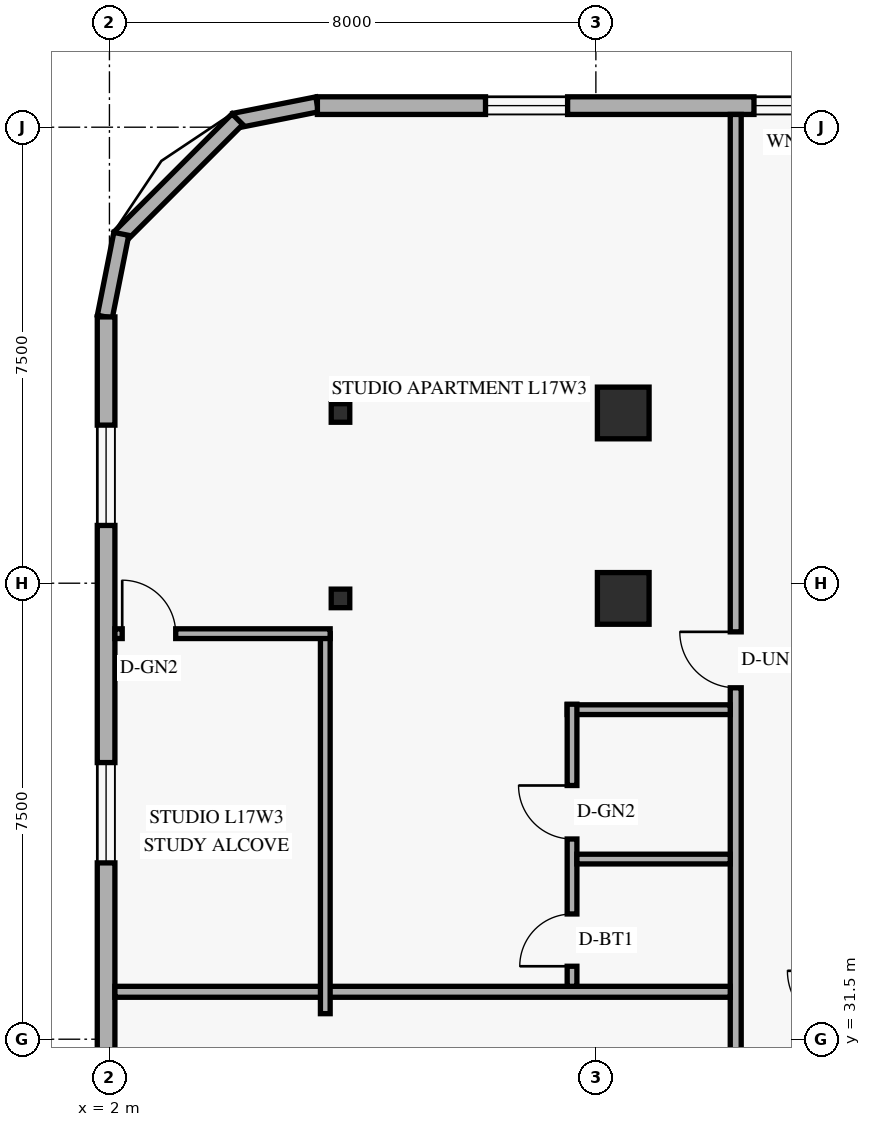
"""IFC4 building model, lengths in metres.
Left out: names, types, materials, properties, quantities, classifications, styles, units other than length and angle.
Written with IfcOpenShell. Run it as: python <this file> out.ifc"""

import sys

from ifc_helpers import new_model, si_unit, direction, frame, frame_2d, origin, origin_2d, place, context, subcontext, project, spatial, rectangle, hollow_rectangle, extrude, element, fill, save


model = new_model("IFC4")
c1 = context("Model", 3, precision=1e-05, world=origin(), true_north=direction((0.0, 1.0)))
c2 = subcontext(c1, "Body", "Model", "MODEL_VIEW")
j1 = project(units=[si_unit("LENGTHUNIT", "METRE"), si_unit("PLANEANGLEUNIT", "RADIAN")], contexts=[c1])
p1 = place(None, origin())
s1 = spatial("IfcSite", under=j1, at=p1, CompositionType="ELEMENT")
p2 = place(p1, origin())
s2 = spatial("IfcBuilding", under=s1, at=p2, CompositionType="ELEMENT")
p3 = place(p2, frame((0.0, 0.0, 67.8)))
s3 = spatial("IfcBuildingStorey", under=s2, at=p3, CompositionType="ELEMENT", Elevation=67.8)
for number, where, z_axis, x_axis in (
    (1, (5.8, 38.75, 0.0), (0.0, 0.0, 1.0), (1.0, 0.0, 0.0)),
    (2, (5.8, 41.8, 0.0), (0.0, 0.0, 1.0), (1.0, 0.0, 0.0)),
):
    element("IfcColumn", number, at=place(p3, frame(where, z_axis=z_axis, x_axis=x_axis)), inside=s3, PredefinedType="COLUMN", context=c2, shape_type="SweptSolid", body=[
        extrude(hollow_rectangle(XDim=0.305, YDim=0.305, WallThickness=0.013, at=origin_2d()), origin(), (0.0, 0.0, 1.0), 3.6),
    ])
for number, where, z_axis, x_axis in (
    (3, (10.45, 38.75, 0.0), (0.0, 0.0, 1.0), (1.0, 0.0, 0.0)),
    (4, (10.45, 41.8, 0.0), (0.0, 0.0, 1.0), (1.0, 0.0, 0.0)),
):
    element("IfcColumn", number, at=place(p3, frame(where, z_axis=z_axis, x_axis=x_axis)), inside=s3, PredefinedType="COLUMN", context=c2, shape_type="SweptSolid", body=[
        extrude(rectangle(XDim=0.85, YDim=0.85, at=origin_2d()), origin(), (0.0, 0.0, 1.0), 3.6),
    ])
p4 = place(p3, frame((5.417, 46.876, 0.0), z_axis=(0.0, 0.0, 1.0), x_axis=(-0.980809899341, -0.19496651342, 0.0)))
e5 = element("IfcWall", 5, at=p4, inside=s3, PredefinedType="SOLIDWALL", context=c2, shape_type="SweptSolid", body=[
    extrude(rectangle(XDim=1.389, YDim=0.25, at=frame_2d((0.694, 0.0))), origin(), (0.0, 0.0, 1.0), 3.3),
])
p5 = place(p3, frame((4.105, 46.632, 0.0), z_axis=(0.0, 0.0, 1.0), x_axis=(-0.707106781187, -0.707106781187, 0.0)))
e6 = element("IfcWall", 6, at=p5, inside=s3, PredefinedType="SOLIDWALL", context=c2, shape_type="SweptSolid", body=[
    extrude(rectangle(XDim=2.739, YDim=0.25, at=frame_2d((1.37, 0.0))), origin(), (0.0, 0.0, 1.0), 3.3),
])
p6 = place(p3, frame((2.195, 44.746, 0.0), z_axis=(0.0, 0.0, 1.0), x_axis=(-0.19496651342, -0.980809899341, 0.0)))
e7 = element("IfcWall", 7, at=p6, inside=s3, PredefinedType="SOLIDWALL", context=c2, shape_type="SweptSolid", body=[
    extrude(rectangle(XDim=1.389, YDim=0.25, at=frame_2d((0.694, 0.0))), origin(), (0.0, 0.0, 1.0), 3.3),
])
p7 = place(p3, frame((44.98, 46.855, 0.0), z_axis=(0.0, 0.0, 1.0), x_axis=(-1.0, 0.0, 0.0)))
e8 = element("IfcWall", 8, at=p7, inside=s3, PredefinedType="SOLIDWALL", context=c2, shape_type="SweptSolid", body=[
    extrude(rectangle(XDim=39.56, YDim=0.29, at=frame_2d((19.78, 0.0))), origin(), (0.0, 0.0, 1.0), 3.3),
])
p8 = place(p7, frame((35.445, 0.0, 0.85)))
e9 = element("IfcOpeningElement", 9, at=p8, cuts=e8, PredefinedType="OPENING", context=c2, shape_type="SweptSolid", body=[
    extrude(rectangle(XDim=1.35, YDim=1.55, at=frame_2d((0.675, 0.775))), frame((0.0, 0.155, 0.0), z_axis=(0.0, -1.0, 0.0), x_axis=(1.0, 0.0, 0.0)), (0.0, 0.0, 1.0), 0.31),
])
p9 = place(p7, frame((31.18, 0.0, 0.85)))
e10 = element("IfcOpeningElement", 10, at=p9, cuts=e8, PredefinedType="OPENING", context=c2, shape_type="SweptSolid", body=[
    extrude(rectangle(XDim=1.2, YDim=1.5, at=frame_2d((0.6, 0.75))), frame((0.0, 0.155, 0.0), z_axis=(0.0, -1.0, 0.0), x_axis=(1.0, 0.0, 0.0)), (0.0, 0.0, 1.0), 0.31),
])
p10 = place(p7, frame((25.834, 0.0, 0.85)))
e11 = element("IfcOpeningElement", 11, at=p10, cuts=e8, PredefinedType="OPENING", context=c2, shape_type="SweptSolid", body=[
    extrude(rectangle(XDim=1.35, YDim=1.55, at=frame_2d((0.675, 0.775))), frame((0.0, 0.155, 0.0), z_axis=(0.0, -1.0, 0.0), x_axis=(1.0, 0.0, 0.0)), (0.0, 0.0, 1.0), 0.31),
])
p11 = place(p7, frame((18.799, 0.0, 0.85)))
e12 = element("IfcOpeningElement", 12, at=p11, cuts=e8, PredefinedType="OPENING", context=c2, shape_type="SweptSolid", body=[
    extrude(rectangle(XDim=1.35, YDim=1.55, at=frame_2d((0.675, 0.775))), frame((0.0, 0.155, 0.0), z_axis=(0.0, -1.0, 0.0), x_axis=(1.0, 0.0, 0.0)), (0.0, 0.0, 1.0), 0.31),
])
p12 = place(p7, frame((12.51, 0.0, 0.85)))
e13 = element("IfcOpeningElement", 13, at=p12, cuts=e8, PredefinedType="OPENING", context=c2, shape_type="SweptSolid", body=[
    extrude(rectangle(XDim=1.35, YDim=1.55, at=frame_2d((0.675, 0.775))), frame((0.0, 0.155, 0.0), z_axis=(0.0, -1.0, 0.0), x_axis=(1.0, 0.0, 0.0)), (0.0, 0.0, 1.0), 0.31),
])
p13 = place(p7, frame((7.82, 0.0, 0.85)))
e14 = element("IfcOpeningElement", 14, at=p13, cuts=e8, PredefinedType="OPENING", context=c2, shape_type="SweptSolid", body=[
    extrude(rectangle(XDim=1.35, YDim=1.55, at=frame_2d((0.675, 0.775))), frame((0.0, 0.155, 0.0), z_axis=(0.0, -1.0, 0.0), x_axis=(1.0, 0.0, 0.0)), (0.0, 0.0, 1.0), 0.31),
])
p14 = place(p7, frame((3.04, 0.0, 0.85)))
e15 = element("IfcOpeningElement", 15, at=p14, cuts=e8, PredefinedType="OPENING", context=c2, shape_type="SweptSolid", body=[
    extrude(rectangle(XDim=1.35, YDim=1.55, at=frame_2d((0.675, 0.775))), frame((0.0, 0.155, 0.0), z_axis=(0.0, -1.0, 0.0), x_axis=(1.0, 0.0, 0.0)), (0.0, 0.0, 1.0), 0.31),
])
p15 = place(p3, frame((1.945, 43.38, 0.0), z_axis=(0.0, 0.0, 1.0), x_axis=(0.0, -1.0, 0.0)))
e16 = element("IfcWall", 16, at=p15, inside=s3, PredefinedType="SOLIDWALL", context=c2, shape_type="SweptSolid", body=[
    extrude(rectangle(XDim=38.76, YDim=0.29, at=frame_2d((19.38, 0.0))), origin(), (0.0, 0.0, 1.0), 3.3),
])
p16 = place(p15, frame((31.925, 0.0, 0.85)))
e17 = element("IfcOpeningElement", 17, at=p16, cuts=e16, PredefinedType="OPENING", context=c2, shape_type="SweptSolid", body=[
    extrude(rectangle(XDim=1.65, YDim=1.6, at=frame_2d((0.825, 0.8))), frame((0.0, 0.155, 0.0), z_axis=(0.0, -1.0, 0.0), x_axis=(1.0, 0.0, 0.0)), (0.0, 0.0, 1.0), 0.31),
])
p17 = place(p15, frame((22.97, 0.0, 0.85)))
e18 = element("IfcOpeningElement", 18, at=p17, cuts=e16, PredefinedType="OPENING", context=c2, shape_type="SweptSolid", body=[
    extrude(rectangle(XDim=1.65, YDim=1.6, at=frame_2d((0.825, 0.8))), frame((0.0, 0.155, 0.0), z_axis=(0.0, -1.0, 0.0), x_axis=(1.0, 0.0, 0.0)), (0.0, 0.0, 1.0), 0.31),
])
p18 = place(p15, frame((15.15, 0.0, 0.85)))
e19 = element("IfcOpeningElement", 19, at=p18, cuts=e16, PredefinedType="OPENING", context=c2, shape_type="SweptSolid", body=[
    extrude(rectangle(XDim=1.65, YDim=1.6, at=frame_2d((0.825, 0.8))), frame((0.0, 0.155, 0.0), z_axis=(0.0, -1.0, 0.0), x_axis=(1.0, 0.0, 0.0)), (0.0, 0.0, 1.0), 0.31),
])
p19 = place(p15, frame((7.33, 0.0, 0.85)))
e20 = element("IfcOpeningElement", 20, at=p19, cuts=e16, PredefinedType="OPENING", context=c2, shape_type="SweptSolid", body=[
    extrude(rectangle(XDim=1.65, YDim=1.6, at=frame_2d((0.825, 0.8))), frame((0.0, 0.155, 0.0), z_axis=(0.0, -1.0, 0.0), x_axis=(1.0, 0.0, 0.0)), (0.0, 0.0, 1.0), 0.31),
])
p20 = place(p15, frame((1.78, 0.0, 0.85)))
e21 = element("IfcOpeningElement", 21, at=p20, cuts=e16, PredefinedType="OPENING", context=c2, shape_type="SweptSolid", body=[
    extrude(rectangle(XDim=1.65, YDim=1.6, at=frame_2d((0.825, 0.8))), frame((0.0, 0.155, 0.0), z_axis=(0.0, -1.0, 0.0), x_axis=(1.0, 0.0, 0.0)), (0.0, 0.0, 1.0), 0.31),
])
p21 = place(p3, frame((12.3, 1.29, 0.0), z_axis=(0.0, 0.0, 1.0), x_axis=(0.0, 1.0, 0.0)))
e22 = element("IfcWall", 22, at=p21, inside=s3, PredefinedType="STANDARD", context=c2, shape_type="SweptSolid", body=[
    extrude(rectangle(XDim=45.42, YDim=0.18, at=frame_2d((22.71, 0.0))), origin(), (0.0, 0.0, 1.0), 2.589),
])
p22 = place(p21, frame((9.41, 0.0, 0.0)))
e23 = element("IfcOpeningElement", 23, at=p22, cuts=e22, PredefinedType="OPENING", context=c2, shape_type="SweptSolid", body=[
    extrude(rectangle(XDim=0.92, YDim=2.15, at=frame_2d((0.46, 1.075))), frame((0.0, 0.1, 0.0), z_axis=(0.0, -1.0, 0.0), x_axis=(1.0, 0.0, 0.0)), (0.0, 0.0, 1.0), 0.2),
])
p23 = place(p21, frame((20.35, 0.0, 0.0)))
e24 = element("IfcOpeningElement", 24, at=p23, cuts=e22, PredefinedType="OPENING", context=c2, shape_type="SweptSolid", body=[
    extrude(rectangle(XDim=0.92, YDim=2.15, at=frame_2d((0.46, 1.075))), frame((0.0, 0.1, 0.0), z_axis=(0.0, -1.0, 0.0), x_axis=(1.0, 0.0, 0.0)), (0.0, 0.0, 1.0), 0.2),
])
p24 = place(p21, frame((35.99, 0.0, 0.0)))
e25 = element("IfcOpeningElement", 25, at=p24, cuts=e22, PredefinedType="OPENING", context=c2, shape_type="SweptSolid", body=[
    extrude(rectangle(XDim=0.92, YDim=2.15, at=frame_2d((0.46, 1.075))), frame((0.0, 0.1, 0.0), z_axis=(0.0, -1.0, 0.0), x_axis=(1.0, 0.0, 0.0)), (0.0, 0.0, 1.0), 0.2),
])
p25 = place(p3, frame((2.09, 32.28, 0.0), z_axis=(0.0, 0.0, 1.0), x_axis=(1.0, 0.0, 0.0)))
e26 = element("IfcWall", 26, at=p25, inside=s3, PredefinedType="PARTITIONING", context=c2, shape_type="SweptSolid", body=[
    extrude(rectangle(XDim=10.12, YDim=0.18, at=frame_2d((5.06, 0.0))), origin(), (0.0, 0.0, 1.0), 2.589),
])
p26 = place(p3, frame((9.528, 36.92, 0.0), z_axis=(0.0, 0.0, 1.0), x_axis=(1.0, 0.0, 0.0)))
e27 = element("IfcWall", 27, at=p26, inside=s3, PredefinedType="PLUMBINGWALL", context=c2, shape_type="SweptSolid", body=[
    extrude(rectangle(XDim=2.682, YDim=0.16, at=frame_2d((1.341, 0.0))), origin(), (0.0, 0.0, 1.0), 2.589),
])
p27 = place(p3, frame((9.608, 32.37, 0.0), z_axis=(0.0, 0.0, 1.0), x_axis=(0.0, 1.0, 0.0)))
e28 = element("IfcWall", 28, at=p27, inside=s3, PredefinedType="PLUMBINGWALL", context=c2, shape_type="SweptSolid", body=[
    extrude(rectangle(XDim=4.64, YDim=0.16, at=frame_2d((2.32, 0.0))), origin(), (0.0, 0.0, 1.0), 2.872),
])
p28 = place(p27, frame((0.33, 0.0, 0.0)))
e29 = element("IfcOpeningElement", 29, at=p28, cuts=e28, PredefinedType="OPENING", context=c2, shape_type="SweptSolid", body=[
    extrude(rectangle(XDim=0.86, YDim=2.12, at=frame_2d((0.43, 1.06))), frame((0.0, 0.09, 0.0), z_axis=(0.0, -1.0, 0.0), x_axis=(1.0, 0.0, 0.0)), (0.0, 0.0, 1.0), 0.18),
])
p29 = place(p27, frame((2.423, 0.0, 0.0)))
e30 = element("IfcOpeningElement", 30, at=p29, cuts=e28, PredefinedType="OPENING", context=c2, shape_type="SweptSolid", body=[
    extrude(rectangle(XDim=0.88, YDim=2.12, at=frame_2d((0.44, 1.06))), frame((0.0, 0.09, 0.0), z_axis=(0.0, -1.0, 0.0), x_axis=(1.0, 0.0, 0.0)), (0.0, 0.0, 1.0), 0.18),
])
p30 = place(p3, frame((9.688, 34.463, 0.0), z_axis=(0.0, 0.0, 1.0), x_axis=(1.0, 0.0, 0.0)))
e31 = element("IfcWall", 31, at=p30, inside=s3, PredefinedType="PLUMBINGWALL", context=c2, shape_type="SweptSolid", body=[
    extrude(rectangle(XDim=2.522, YDim=0.16, at=frame_2d((1.261, 0.0))), origin(), (0.0, 0.0, 1.0), 2.589),
])
p31 = place(p3, frame((5.55, 31.92, 0.0), z_axis=(0.0, 0.0, 1.0), x_axis=(0.0, 1.0, 0.0)))
e32 = element("IfcWall", 32, at=p31, inside=s3, PredefinedType="PARTITIONING", context=c2, shape_type="SweptSolid", body=[
    extrude(rectangle(XDim=6.25, YDim=0.16, at=frame_2d((3.125, 0.0))), origin(), (0.0, 0.0, 1.0), 3.3),
])
p32 = place(p3, frame((2.09, 38.17, 0.0), z_axis=(0.0, 0.0, 1.0), x_axis=(1.0, 0.0, 0.0)))
e33 = element("IfcWall", 33, at=p32, inside=s3, PredefinedType="PARTITIONING", context=c2, shape_type="SweptSolid", body=[
    extrude(rectangle(XDim=3.54, YDim=0.16, at=frame_2d((1.77, 0.0))), origin(), (0.0, 0.0, 1.0), 3.3),
])
p33 = place(p32, frame((0.12, 0.0, 0.0)))
e34 = element("IfcOpeningElement", 34, at=p33, cuts=e33, PredefinedType="OPENING", context=c2, shape_type="SweptSolid", body=[
    extrude(rectangle(XDim=0.88, YDim=2.12, at=frame_2d((0.44, 1.06))), frame((0.0, 0.09, 0.0), z_axis=(0.0, -1.0, 0.0), x_axis=(1.0, 0.0, 0.0)), (0.0, 0.0, 1.0), 0.18),
])
p34 = place(p8, origin())
e35 = element("IfcWindow", 35, at=p34, inside=s3, PartitioningType="SINGLE_PANEL", PredefinedType="WINDOW", context=c2, shape_type="SweptSolid", body=[
    extrude(rectangle(XDim=1.35, YDim=1.55, at=frame_2d((0.675, 0.775))), frame((0.0, 0.03, 0.0), z_axis=(0.0, -1.0, 0.0), x_axis=(1.0, 0.0, 0.0)), (0.0, 0.0, 1.0), 0.06),
])
fill(e9, e35)
p35 = place(p9, origin())
e36 = element("IfcWindow", 36, at=p35, inside=s3, PartitioningType="SINGLE_PANEL", PredefinedType="WINDOW", context=c2, shape_type="SweptSolid", body=[
    extrude(rectangle(XDim=1.2, YDim=1.5, at=frame_2d((0.6, 0.75))), frame((0.0, 0.03, 0.0), z_axis=(0.0, -1.0, 0.0), x_axis=(1.0, 0.0, 0.0)), (0.0, 0.0, 1.0), 0.06),
])
fill(e10, e36)
p36 = place(p19, origin())
e37 = element("IfcWindow", 37, at=p36, inside=s3, PartitioningType="SINGLE_PANEL", PredefinedType="WINDOW", context=c2, shape_type="SweptSolid", body=[
    extrude(rectangle(XDim=1.65, YDim=1.6, at=frame_2d((0.825, 0.8))), frame((0.0, 0.03, 0.0), z_axis=(0.0, -1.0, 0.0), x_axis=(1.0, 0.0, 0.0)), (0.0, 0.0, 1.0), 0.06),
])
fill(e20, e37)
p37 = place(p20, origin())
e38 = element("IfcWindow", 38, at=p37, inside=s3, PartitioningType="SINGLE_PANEL", PredefinedType="WINDOW", context=c2, shape_type="SweptSolid", body=[
    extrude(rectangle(XDim=1.65, YDim=1.6, at=frame_2d((0.825, 0.8))), frame((0.0, 0.03, 0.0), z_axis=(0.0, -1.0, 0.0), x_axis=(1.0, 0.0, 0.0)), (0.0, 0.0, 1.0), 0.06),
])
fill(e21, e38)
p38 = place(p33, origin())
e39 = element("IfcDoor", 39, at=p38, inside=s3, OperationType="SINGLE_SWING_LEFT", PredefinedType="DOOR", context=c2, shape_type="SweptSolid", body=[
    extrude(rectangle(XDim=0.88, YDim=2.12, at=frame_2d((0.44, 1.06))), frame((0.0, 0.025, 0.0), z_axis=(0.0, -1.0, 0.0), x_axis=(1.0, 0.0, 0.0)), (0.0, 0.0, 1.0), 0.05),
])
fill(e34, e39)
p39 = place(p24, origin())
e40 = element("IfcDoor", 40, at=p39, inside=s3, OperationType="SINGLE_SWING_RIGHT", PredefinedType="DOOR", context=c2, shape_type="SweptSolid", body=[
    extrude(rectangle(XDim=0.92, YDim=2.15, at=frame_2d((0.46, 1.075))), frame((0.0, 0.025, 0.0), z_axis=(0.0, -1.0, 0.0), x_axis=(1.0, 0.0, 0.0)), (0.0, 0.0, 1.0), 0.05),
])
fill(e25, e40)
p40 = place(p28, origin())
e41 = element("IfcDoor", 41, at=p40, inside=s3, OperationType="SINGLE_SWING_LEFT", PredefinedType="DOOR", context=c2, shape_type="SweptSolid", body=[
    extrude(rectangle(XDim=0.86, YDim=2.12, at=frame_2d((0.43, 1.06))), frame((0.0, 0.025, 0.0), z_axis=(0.0, -1.0, 0.0), x_axis=(1.0, 0.0, 0.0)), (0.0, 0.0, 1.0), 0.05),
])
fill(e29, e41)
p41 = place(p29, origin())
e42 = element("IfcDoor", 42, at=p41, inside=s3, OperationType="SINGLE_SWING_RIGHT", PredefinedType="DOOR", context=c2, shape_type="SweptSolid", body=[
    extrude(rectangle(XDim=0.88, YDim=2.12, at=frame_2d((0.44, 1.06))), frame((0.0, 0.025, 0.0), z_axis=(0.0, -1.0, 0.0), x_axis=(1.0, 0.0, 0.0)), (0.0, 0.0, 1.0), 0.05),
])
fill(e30, e42)
save(model, sys.argv[1])
